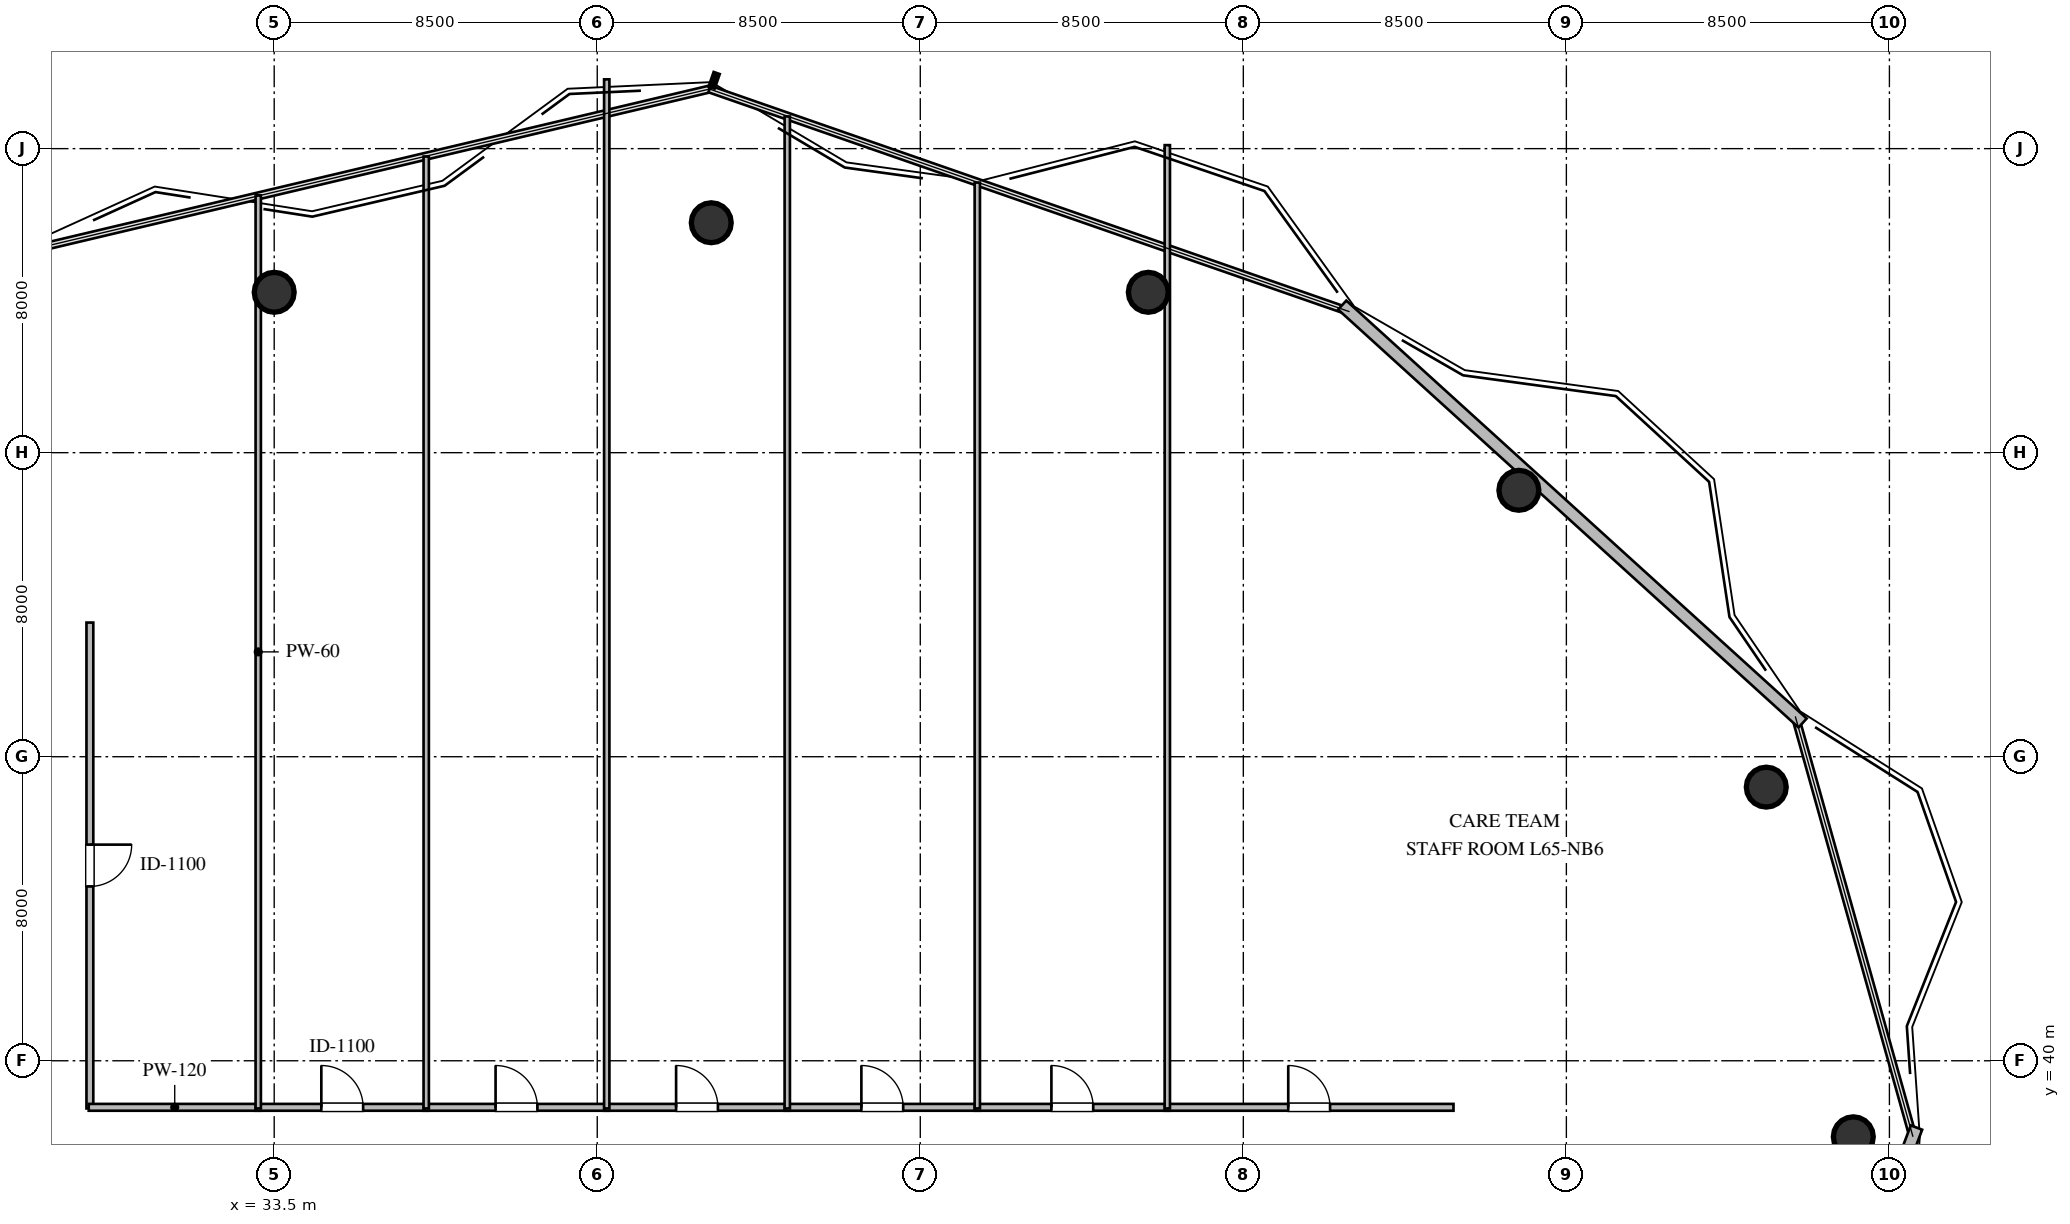
"""IFC4 building model, lengths in metres.
Left out: names, types, materials, properties, quantities, classifications, styles, units other than length and angle.
Written with IfcOpenShell. Run it as: python <this file> out.ifc"""

import sys

from ifc_helpers import new_model, si_unit, direction, frame, frame_2d, origin, origin_2d, place, context, subcontext, project, spatial, rectangle, circle, extrude, element, fill, save


model = new_model("IFC4")
c1 = context("Model", 3, precision=1e-05, world=origin(), true_north=direction((0.0, 1.0)))
c2 = subcontext(c1, "Body", "Model", "MODEL_VIEW")
j1 = project(units=[si_unit("LENGTHUNIT", "METRE"), si_unit("PLANEANGLEUNIT", "RADIAN")], contexts=[c1])
p1 = place(None, origin())
s1 = spatial("IfcSite", under=j1, at=p1, CompositionType="ELEMENT")
p2 = place(p1, origin())
s2 = spatial("IfcBuilding", under=s1, at=p2, CompositionType="ELEMENT")
p3 = place(p2, frame((0.0, 0.0, 246.0)))
s3 = spatial("IfcBuildingStorey", under=s2, at=p3, CompositionType="ELEMENT", Elevation=246.0)
for number, where, z_axis, x_axis in (
    (1, (75.05, 38.0, 0.0), (0.0, 0.0, 1.0), (1.0, 0.0, 0.0)),
    (2, (72.76, 47.2, 0.0), (0.0, 0.0, 1.0), (1.0, 0.0, 0.0)),
    (3, (66.25, 55.01, 0.0), (0.0, 0.0, 1.0), (1.0, 0.0, 0.0)),
    (4, (56.5, 60.22, 0.0), (0.0, 0.0, 1.0), (1.0, 0.0, 0.0)),
    (5, (45.0, 62.05, 0.0), (0.0, 0.0, 1.0), (1.0, 0.0, 0.0)),
    (6, (33.5, 60.22, 0.0), (0.0, 0.0, 1.0), (1.0, 0.0, 0.0)),
):
    element("IfcColumn", number, at=place(p3, frame(where, z_axis=z_axis, x_axis=x_axis)), inside=s3, PredefinedType="COLUMN", context=c2, shape_type="SweptSolid", body=[
        extrude(circle(Radius=0.525, at=origin_2d()), origin(), (0.0, 0.0, 1.0), 3.6),
    ])
p4 = place(p3, frame((76.712, 38.243, 0.0), z_axis=(0.0, 0.0, 1.0), x_axis=(-0.353659523244, -0.935374225441, 0.0)))
e7 = element("IfcWall", 7, at=p4, inside=s3, PredefinedType="STANDARD", context=c2, shape_type="SweptSolid", body=[
    extrude(rectangle(XDim=14.172, YDim=0.32, at=frame_2d((7.086, 0.0))), origin(), (0.0, 0.0, 1.0), 3.36),
])
p5 = place(p3, frame((61.602, 59.884, 0.0), z_axis=(0.0, 0.0, 1.0), x_axis=(0.740416582554, -0.672148260638, 0.0)))
e8 = element("IfcWall", 8, at=p5, inside=s3, PredefinedType="STANDARD", context=c2, shape_type="SweptSolid", body=[
    extrude(rectangle(XDim=16.361, YDim=0.32, at=frame_2d((8.181, 0.0))), origin(), (0.0, 0.0, 1.0), 3.36),
])
p6 = place(p3, frame((28.65, 51.53, 0.0), z_axis=(0.0, 0.0, 1.0), x_axis=(0.0, -1.0, 0.0)))
e9 = element("IfcWall", 9, at=p6, inside=s3, PredefinedType="PARTITIONING", context=c2, shape_type="SweptSolid", body=[
    extrude(rectangle(XDim=12.785, YDim=0.18, at=frame_2d((6.393, 0.0))), origin(), (0.0, 0.0, 1.0), 3.36),
])
p7 = place(p6, frame((5.843, 0.0, 0.0)))
e10 = element("IfcOpeningElement", 10, at=p7, cuts=e9, PredefinedType="OPENING", context=c2, shape_type="SweptSolid", body=[
    extrude(rectangle(XDim=1.1, YDim=2.1, at=frame_2d((0.55, 1.05))), frame((0.0, 0.1, 0.0), z_axis=(0.0, -1.0, 0.0), x_axis=(1.0, 0.0, 0.0)), (0.0, 0.0, 1.0), 0.2),
])
p8 = place(p3, frame((28.62, 38.775, 0.0), z_axis=(0.0, 0.0, 1.0), x_axis=(1.0, 0.0, 0.0)))
e11 = element("IfcWall", 11, at=p8, inside=s3, PredefinedType="PARTITIONING", context=c2, shape_type="SweptSolid", body=[
    extrude(rectangle(XDim=4.525, YDim=0.18, at=frame_2d((2.262, 0.0))), origin(), (0.0, 0.0, 1.0), 3.36),
])
p9 = place(p3, frame((33.015, 38.775, 0.0), z_axis=(0.0, 0.0, 1.0), x_axis=(1.0, 0.0, 0.0)))
e12 = element("IfcWall", 12, at=p9, inside=s3, PredefinedType="PARTITIONING", context=c2, shape_type="SweptSolid", body=[
    extrude(rectangle(XDim=4.55, YDim=0.18, at=frame_2d((2.275, 0.0))), origin(), (0.0, 0.0, 1.0), 3.36),
])
p10 = place(p9, frame((1.725, 0.0, 0.0)))
e13 = element("IfcOpeningElement", 13, at=p10, cuts=e12, PredefinedType="OPENING", context=c2, shape_type="SweptSolid", body=[
    extrude(rectangle(XDim=1.1, YDim=2.1, at=frame_2d((0.55, 1.05))), frame((0.0, 0.1, 0.0), z_axis=(0.0, -1.0, 0.0), x_axis=(1.0, 0.0, 0.0)), (0.0, 0.0, 1.0), 0.2),
])
p11 = place(p3, frame((37.435, 38.775, 0.0), z_axis=(0.0, 0.0, 1.0), x_axis=(1.0, 0.0, 0.0)))
e14 = element("IfcWall", 14, at=p11, inside=s3, PredefinedType="PARTITIONING", context=c2, shape_type="SweptSolid", body=[
    extrude(rectangle(XDim=4.88, YDim=0.18, at=frame_2d((2.44, 0.0))), origin(), (0.0, 0.0, 1.0), 3.36),
])
p12 = place(p11, frame((1.89, 0.0, 0.0)))
e15 = element("IfcOpeningElement", 15, at=p12, cuts=e14, PredefinedType="OPENING", context=c2, shape_type="SweptSolid", body=[
    extrude(rectangle(XDim=1.1, YDim=2.1, at=frame_2d((0.55, 1.05))), frame((0.0, 0.1, 0.0), z_axis=(0.0, -1.0, 0.0), x_axis=(1.0, 0.0, 0.0)), (0.0, 0.0, 1.0), 0.2),
])
p13 = place(p3, frame((42.185, 38.775, 0.0), z_axis=(0.0, 0.0, 1.0), x_axis=(1.0, 0.0, 0.0)))
e16 = element("IfcWall", 16, at=p13, inside=s3, PredefinedType="PARTITIONING", context=c2, shape_type="SweptSolid", body=[
    extrude(rectangle(XDim=4.88, YDim=0.18, at=frame_2d((2.44, 0.0))), origin(), (0.0, 0.0, 1.0), 3.36),
])
p14 = place(p13, frame((1.89, 0.0, 0.0)))
e17 = element("IfcOpeningElement", 17, at=p14, cuts=e16, PredefinedType="OPENING", context=c2, shape_type="SweptSolid", body=[
    extrude(rectangle(XDim=1.1, YDim=2.1, at=frame_2d((0.55, 1.05))), frame((0.0, 0.1, 0.0), z_axis=(0.0, -1.0, 0.0), x_axis=(1.0, 0.0, 0.0)), (0.0, 0.0, 1.0), 0.2),
])
p15 = place(p3, frame((46.935, 38.775, 0.0), z_axis=(0.0, 0.0, 1.0), x_axis=(1.0, 0.0, 0.0)))
e18 = element("IfcWall", 18, at=p15, inside=s3, PredefinedType="PARTITIONING", context=c2, shape_type="SweptSolid", body=[
    extrude(rectangle(XDim=5.13, YDim=0.18, at=frame_2d((2.565, 0.0))), origin(), (0.0, 0.0, 1.0), 3.36),
])
p16 = place(p15, frame((2.015, 0.0, 0.0)))
e19 = element("IfcOpeningElement", 19, at=p16, cuts=e18, PredefinedType="OPENING", context=c2, shape_type="SweptSolid", body=[
    extrude(rectangle(XDim=1.1, YDim=2.1, at=frame_2d((0.55, 1.05))), frame((0.0, 0.1, 0.0), z_axis=(0.0, -1.0, 0.0), x_axis=(1.0, 0.0, 0.0)), (0.0, 0.0, 1.0), 0.2),
])
p17 = place(p3, frame((51.935, 38.775, 0.0), z_axis=(0.0, 0.0, 1.0), x_axis=(1.0, 0.0, 0.0)))
e20 = element("IfcWall", 20, at=p17, inside=s3, PredefinedType="PARTITIONING", context=c2, shape_type="SweptSolid", body=[
    extrude(rectangle(XDim=5.13, YDim=0.18, at=frame_2d((2.565, 0.0))), origin(), (0.0, 0.0, 1.0), 3.36),
])
p18 = place(p17, frame((2.015, 0.0, 0.0)))
e21 = element("IfcOpeningElement", 21, at=p18, cuts=e20, PredefinedType="OPENING", context=c2, shape_type="SweptSolid", body=[
    extrude(rectangle(XDim=1.1, YDim=2.1, at=frame_2d((0.55, 1.05))), frame((0.0, 0.1, 0.0), z_axis=(0.0, -1.0, 0.0), x_axis=(1.0, 0.0, 0.0)), (0.0, 0.0, 1.0), 0.2),
])
p19 = place(p3, frame((56.935, 38.775, 0.0), z_axis=(0.0, 0.0, 1.0), x_axis=(1.0, 0.0, 0.0)))
e22 = element("IfcWall", 22, at=p19, inside=s3, PredefinedType="PARTITIONING", context=c2, shape_type="SweptSolid", body=[
    extrude(rectangle(XDim=7.595, YDim=0.18, at=frame_2d((3.797, 0.0))), origin(), (0.0, 0.0, 1.0), 3.36),
])
p20 = place(p19, frame((3.247, 0.0, 0.0)))
e23 = element("IfcOpeningElement", 23, at=p20, cuts=e22, PredefinedType="OPENING", context=c2, shape_type="SweptSolid", body=[
    extrude(rectangle(XDim=1.1, YDim=2.1, at=frame_2d((0.55, 1.05))), frame((0.0, 0.1, 0.0), z_axis=(0.0, -1.0, 0.0), x_axis=(1.0, 0.0, 0.0)), (0.0, 0.0, 1.0), 0.2),
])
p21 = place(p3, frame((33.08, 62.772, 0.0), z_axis=(0.0, 0.0, 1.0), x_axis=(0.0, -1.0, 0.0)))
e24 = element("IfcWall", 24, at=p21, inside=s3, PredefinedType="PARTITIONING", context=c2, shape_type="SweptSolid", body=[
    extrude(rectangle(XDim=24.027, YDim=0.14, at=frame_2d((12.013, 0.0))), origin(), (0.0, 0.0, 1.0), 2.89),
])
p22 = place(p3, frame((37.5, 63.793, 0.0), z_axis=(0.0, 0.0, 1.0), x_axis=(0.0, -1.0, 0.0)))
e25 = element("IfcWall", 25, at=p22, inside=s3, PredefinedType="PARTITIONING", context=c2, shape_type="SweptSolid", body=[
    extrude(rectangle(XDim=25.048, YDim=0.14, at=frame_2d((12.524, 0.0))), origin(), (0.0, 0.0, 1.0), 3.36),
])
p23 = place(p3, frame((42.25, 65.823, 0.0), z_axis=(0.0, 0.0, 1.0), x_axis=(0.0, -1.0, 0.0)))
e26 = element("IfcWall", 26, at=p23, inside=s3, PredefinedType="PARTITIONING", context=c2, shape_type="SweptSolid", body=[
    extrude(rectangle(XDim=27.078, YDim=0.14, at=frame_2d((13.539, 0.0))), origin(), (0.0, 0.0, 1.0), 3.36),
])
p24 = place(p3, frame((47.0, 64.846, 0.0), z_axis=(0.0, 0.0, 1.0), x_axis=(0.0, -1.0, 0.0)))
e27 = element("IfcWall", 27, at=p24, inside=s3, PredefinedType="PARTITIONING", context=c2, shape_type="SweptSolid", body=[
    extrude(rectangle(XDim=26.101, YDim=0.14, at=frame_2d((13.051, 0.0))), origin(), (0.0, 0.0, 1.0), 3.36),
])
p25 = place(p3, frame((52.0, 63.107, 0.0), z_axis=(0.0, 0.0, 1.0), x_axis=(0.0, -1.0, 0.0)))
e28 = element("IfcWall", 28, at=p25, inside=s3, PredefinedType="PARTITIONING", context=c2, shape_type="SweptSolid", body=[
    extrude(rectangle(XDim=24.362, YDim=0.14, at=frame_2d((12.181, 0.0))), origin(), (0.0, 0.0, 1.0), 3.36),
])
p26 = place(p3, frame((57.0, 64.092, 0.0), z_axis=(0.0, 0.0, 1.0), x_axis=(0.0, -1.0, 0.0)))
e29 = element("IfcWall", 29, at=p26, inside=s3, PredefinedType="PARTITIONING", context=c2, shape_type="SweptSolid", body=[
    extrude(rectangle(XDim=25.347, YDim=0.14, at=frame_2d((12.673, 0.0))), origin(), (0.0, 0.0, 1.0), 3.36),
])
p27 = place(p7, origin())
e30 = element("IfcDoor", 30, at=p27, inside=s3, OperationType="SINGLE_SWING_LEFT", PredefinedType="DOOR", context=c2, shape_type="SweptSolid", body=[
    extrude(rectangle(XDim=1.1, YDim=2.1, at=frame_2d((0.55, 1.05))), frame((0.0, 0.025, 0.0), z_axis=(0.0, -1.0, 0.0), x_axis=(1.0, 0.0, 0.0)), (0.0, 0.0, 1.0), 0.05),
])
fill(e10, e30)
p28 = place(p10, origin())
e31 = element("IfcDoor", 31, at=p28, inside=s3, OperationType="SINGLE_SWING_LEFT", PredefinedType="DOOR", context=c2, shape_type="SweptSolid", body=[
    extrude(rectangle(XDim=1.1, YDim=2.1, at=frame_2d((0.55, 1.05))), frame((0.0, 0.025, 0.0), z_axis=(0.0, -1.0, 0.0), x_axis=(1.0, 0.0, 0.0)), (0.0, 0.0, 1.0), 0.05),
])
fill(e13, e31)
p29 = place(p12, origin())
e32 = element("IfcDoor", 32, at=p29, inside=s3, OperationType="SINGLE_SWING_LEFT", PredefinedType="DOOR", context=c2, shape_type="SweptSolid", body=[
    extrude(rectangle(XDim=1.1, YDim=2.1, at=frame_2d((0.55, 1.05))), frame((0.0, 0.025, 0.0), z_axis=(0.0, -1.0, 0.0), x_axis=(1.0, 0.0, 0.0)), (0.0, 0.0, 1.0), 0.05),
])
fill(e15, e32)
p30 = place(p14, origin())
e33 = element("IfcDoor", 33, at=p30, inside=s3, OperationType="SINGLE_SWING_LEFT", PredefinedType="DOOR", context=c2, shape_type="SweptSolid", body=[
    extrude(rectangle(XDim=1.1, YDim=2.1, at=frame_2d((0.55, 1.05))), frame((0.0, 0.025, 0.0), z_axis=(0.0, -1.0, 0.0), x_axis=(1.0, 0.0, 0.0)), (0.0, 0.0, 1.0), 0.05),
])
fill(e17, e33)
p31 = place(p16, origin())
e34 = element("IfcDoor", 34, at=p31, inside=s3, OperationType="SINGLE_SWING_LEFT", PredefinedType="DOOR", context=c2, shape_type="SweptSolid", body=[
    extrude(rectangle(XDim=1.1, YDim=2.1, at=frame_2d((0.55, 1.05))), frame((0.0, 0.025, 0.0), z_axis=(0.0, -1.0, 0.0), x_axis=(1.0, 0.0, 0.0)), (0.0, 0.0, 1.0), 0.05),
])
fill(e19, e34)
p32 = place(p18, origin())
e35 = element("IfcDoor", 35, at=p32, inside=s3, OperationType="SINGLE_SWING_LEFT", PredefinedType="DOOR", context=c2, shape_type="SweptSolid", body=[
    extrude(rectangle(XDim=1.1, YDim=2.1, at=frame_2d((0.55, 1.05))), frame((0.0, 0.025, 0.0), z_axis=(0.0, -1.0, 0.0), x_axis=(1.0, 0.0, 0.0)), (0.0, 0.0, 1.0), 0.05),
])
fill(e21, e35)
p33 = place(p20, origin())
e36 = element("IfcDoor", 36, at=p33, inside=s3, OperationType="SINGLE_SWING_LEFT", PredefinedType="DOOR", context=c2, shape_type="SweptSolid", body=[
    extrude(rectangle(XDim=1.1, YDim=2.1, at=frame_2d((0.55, 1.05))), frame((0.0, 0.025, 0.0), z_axis=(0.0, -1.0, 0.0), x_axis=(1.0, 0.0, 0.0)), (0.0, 0.0, 1.0), 0.05),
])
fill(e23, e36)
save(model, sys.argv[1])
